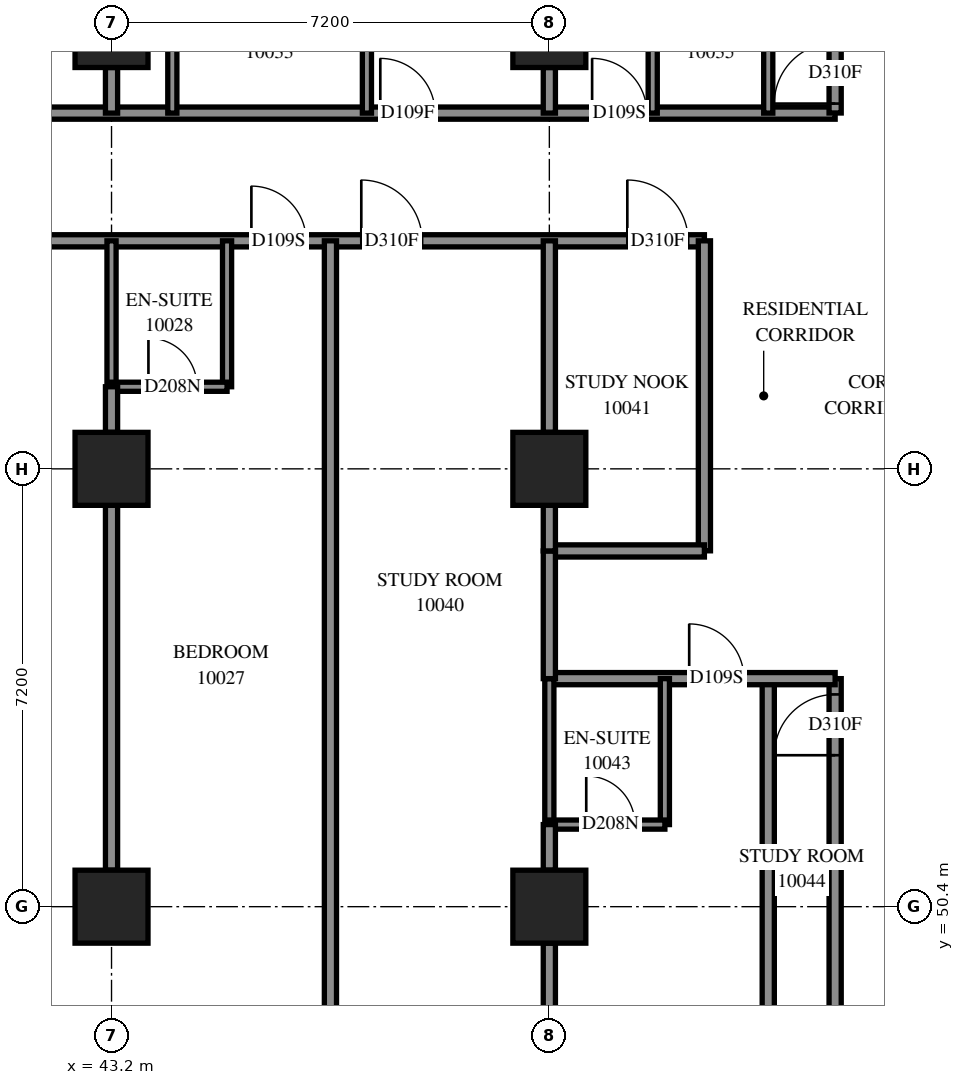
"""IFC4 building model, lengths in metres.
Left out: names, types, materials, properties, quantities, classifications, styles, units other than length and angle.
Written with IfcOpenShell. Run it as: python <this file> out.ifc"""

import sys

from ifc_helpers import new_model, si_unit, direction, frame, frame_2d, origin, origin_2d, place, context, subcontext, project, spatial, rectangle, extrude, element, fill, save


model = new_model("IFC4")
c1 = context("Model", 3, precision=1e-05, world=origin(), true_north=direction((0.0, 1.0)))
c2 = subcontext(c1, "Body", "Model", "MODEL_VIEW")
j1 = project(units=[si_unit("LENGTHUNIT", "METRE"), si_unit("PLANEANGLEUNIT", "RADIAN")], contexts=[c1])
p1 = place(None, origin())
s1 = spatial("IfcSite", under=j1, at=p1, CompositionType="ELEMENT")
p2 = place(p1, origin())
s2 = spatial("IfcBuilding", under=s1, at=p2, CompositionType="ELEMENT")
p3 = place(p2, frame((0.0, 0.0, 40.6)))
s3 = spatial("IfcBuildingStorey", under=s2, at=p3, CompositionType="ELEMENT", Elevation=40.6)
for number, where, z_axis, x_axis in (
    (1, (43.2, 50.4, 0.0), (0.0, 0.0, 1.0), (1.0, 0.0, 0.0)),
    (2, (43.2, 57.6, 0.0), (0.0, 0.0, 1.0), (1.0, 0.0, 0.0)),
    (3, (43.2, 64.8, 0.0), (0.0, 0.0, 1.0), (1.0, 0.0, 0.0)),
    (4, (50.4, 50.4, 0.0), (0.0, 0.0, 1.0), (1.0, 0.0, 0.0)),
    (5, (50.4, 57.6, 0.0), (0.0, 0.0, 1.0), (1.0, 0.0, 0.0)),
    (6, (50.4, 64.8, 0.0), (0.0, 0.0, 1.0), (1.0, 0.0, 0.0)),
):
    element("IfcColumn", number, at=place(p3, frame(where, z_axis=z_axis, x_axis=x_axis)), inside=s3, PredefinedType="COLUMN", context=c2, shape_type="SweptSolid", body=[
        extrude(rectangle(XDim=1.2, YDim=1.2, at=origin_2d()), origin(), (0.0, 0.0, 1.0), 3.1),
    ])
p4 = place(p3, frame((28.8, 61.35, 0.0), z_axis=(0.0, 0.0, 1.0), x_axis=(1.0, 0.0, 0.0)))
e7 = element("IfcWall", 7, at=p4, inside=s3, PredefinedType="PARTITIONING", context=c2, shape_type="SweptSolid", body=[
    extrude(rectangle(XDim=24.15, YDim=0.2, at=frame_2d((12.075, 0.0))), origin(), (0.0, 0.0, 1.0), 3.1),
])
p5 = place(p4, frame((2.3, 0.0, 0.0)))
e8 = element("IfcOpeningElement", 8, at=p5, cuts=e7, PredefinedType="OPENING", context=c2, shape_type="SweptSolid", body=[
    extrude(rectangle(XDim=0.9, YDim=2.1, at=frame_2d((0.45, 1.05))), frame((0.0, 0.11, 0.0), z_axis=(0.0, -1.0, 0.0), x_axis=(1.0, 0.0, 0.0)), (0.0, 0.0, 1.0), 0.22),
])
p6 = place(p4, frame((4.125, 0.0, 0.0)))
e9 = element("IfcOpeningElement", 9, at=p6, cuts=e7, PredefinedType="OPENING", context=c2, shape_type="SweptSolid", body=[
    extrude(rectangle(XDim=1.0, YDim=2.1, at=frame_2d((0.5, 1.05))), frame((0.0, 0.11, 0.0), z_axis=(0.0, -1.0, 0.0), x_axis=(1.0, 0.0, 0.0)), (0.0, 0.0, 1.0), 0.22),
])
p7 = place(p4, frame((11.061, 0.0, 0.0)))
e10 = element("IfcOpeningElement", 10, at=p7, cuts=e7, PredefinedType="OPENING", context=c2, shape_type="SweptSolid", body=[
    extrude(rectangle(XDim=0.9, YDim=2.1, at=frame_2d((0.45, 1.05))), frame((0.0, 0.11, 0.0), z_axis=(0.0, -1.0, 0.0), x_axis=(1.0, 0.0, 0.0)), (0.0, 0.0, 1.0), 0.22),
])
p8 = place(p4, frame((16.7, 0.0, 0.0)))
e11 = element("IfcOpeningElement", 11, at=p8, cuts=e7, PredefinedType="OPENING", context=c2, shape_type="SweptSolid", body=[
    extrude(rectangle(XDim=0.9, YDim=2.1, at=frame_2d((0.45, 1.05))), frame((0.0, 0.11, 0.0), z_axis=(0.0, -1.0, 0.0), x_axis=(1.0, 0.0, 0.0)), (0.0, 0.0, 1.0), 0.22),
])
p9 = place(p4, frame((18.508, 0.0, 0.0)))
e12 = element("IfcOpeningElement", 12, at=p9, cuts=e7, PredefinedType="OPENING", context=c2, shape_type="SweptSolid", body=[
    extrude(rectangle(XDim=1.0, YDim=2.1, at=frame_2d((0.5, 1.05))), frame((0.0, 0.11, 0.0), z_axis=(0.0, -1.0, 0.0), x_axis=(1.0, 0.0, 0.0)), (0.0, 0.0, 1.0), 0.22),
])
p10 = place(p4, frame((22.882, 0.0, 0.0)))
e13 = element("IfcOpeningElement", 13, at=p10, cuts=e7, PredefinedType="OPENING", context=c2, shape_type="SweptSolid", body=[
    extrude(rectangle(XDim=1.0, YDim=2.1, at=frame_2d((0.5, 1.05))), frame((0.0, 0.11, 0.0), z_axis=(0.0, -1.0, 0.0), x_axis=(1.0, 0.0, 0.0)), (0.0, 0.0, 1.0), 0.22),
])
p11 = place(p3, frame((33.452, 63.45, 0.0), z_axis=(0.0, 0.0, 1.0), x_axis=(1.0, 0.0, 0.0)))
e14 = element("IfcWall", 14, at=p11, inside=s3, PredefinedType="PARTITIONING", context=c2, shape_type="SweptSolid", body=[
    extrude(rectangle(XDim=21.648, YDim=0.2, at=frame_2d((10.824, 0.0))), origin(), (0.0, 0.0, 1.0), 3.1),
])
p12 = place(p11, frame((0.142, 0.0, 0.0)))
e15 = element("IfcOpeningElement", 15, at=p12, cuts=e14, PredefinedType="OPENING", context=c2, shape_type="SweptSolid", body=[
    extrude(rectangle(XDim=1.0, YDim=2.1, at=frame_2d((0.5, 1.05))), frame((0.0, 0.11, 0.0), z_axis=(0.0, -1.0, 0.0), x_axis=(1.0, 0.0, 0.0)), (0.0, 0.0, 1.0), 0.22),
])
p13 = place(p11, frame((6.412, 0.0, 0.0)))
e16 = element("IfcOpeningElement", 16, at=p13, cuts=e14, PredefinedType="OPENING", context=c2, shape_type="SweptSolid", body=[
    extrude(rectangle(XDim=0.9, YDim=2.1, at=frame_2d((0.45, 1.05))), frame((0.0, 0.11, 0.0), z_axis=(0.0, -1.0, 0.0), x_axis=(1.0, 0.0, 0.0)), (0.0, 0.0, 1.0), 0.22),
])
p14 = place(p11, frame((14.168, 0.0, 0.0)))
e17 = element("IfcOpeningElement", 17, at=p14, cuts=e14, PredefinedType="OPENING", context=c2, shape_type="SweptSolid", body=[
    extrude(rectangle(XDim=0.9, YDim=2.1, at=frame_2d((0.45, 1.05))), frame((0.0, 0.11, 0.0), z_axis=(0.0, -1.0, 0.0), x_axis=(1.0, 0.0, 0.0)), (0.0, 0.0, 1.0), 0.22),
])
p15 = place(p11, frame((17.651, 0.0, 0.0)))
e18 = element("IfcOpeningElement", 18, at=p15, cuts=e14, PredefinedType="OPENING", context=c2, shape_type="SweptSolid", body=[
    extrude(rectangle(XDim=0.9, YDim=2.1, at=frame_2d((0.45, 1.05))), frame((0.0, 0.11, 0.0), z_axis=(0.0, -1.0, 0.0), x_axis=(1.0, 0.0, 0.0)), (0.0, 0.0, 1.0), 0.22),
])
p16 = place(p3, frame((46.8, 48.729, 0.0), z_axis=(0.0, 0.0, 1.0), x_axis=(0.0, 1.0, 0.0)))
e19 = element("IfcWall", 19, at=p16, inside=s3, PredefinedType="PARTITIONING", context=c2, shape_type="SweptSolid", body=[
    extrude(rectangle(XDim=12.621, YDim=0.2, at=frame_2d((6.311, 0.0))), origin(), (0.0, 0.0, 1.0), 3.1),
])
p17 = place(p3, frame((54.0, 42.384, 0.0), z_axis=(0.0, 0.0, 1.0), x_axis=(0.0, 1.0, 0.0)))
e20 = element("IfcWall", 20, at=p17, inside=s3, PredefinedType="PARTITIONING", context=c2, shape_type="SweptSolid", body=[
    extrude(rectangle(XDim=11.766, YDim=0.2, at=frame_2d((5.883, 0.0))), origin(), (0.0, 0.0, 1.0), 3.1),
])
p18 = place(p3, frame((55.1, 47.9, 0.0), z_axis=(0.0, 0.0, 1.0), x_axis=(0.0, 1.0, 0.0)))
e21 = element("IfcWall", 21, at=p18, inside=s3, PredefinedType="PARTITIONING", context=c2, shape_type="SweptSolid", body=[
    extrude(rectangle(XDim=6.25, YDim=0.2, at=frame_2d((3.125, 0.0))), origin(), (0.0, 0.0, 1.0), 3.1),
])
p19 = place(p18, frame((4.99, 0.0, 0.0)))
e22 = element("IfcOpeningElement", 22, at=p19, cuts=e21, PredefinedType="OPENING", context=c2, shape_type="SweptSolid", body=[
    extrude(rectangle(XDim=1.0, YDim=2.1, at=frame_2d((0.5, 1.05))), frame((0.0, 0.11, 0.0), z_axis=(0.0, -1.0, 0.0), x_axis=(1.0, 0.0, 0.0)), (0.0, 0.0, 1.0), 0.22),
])
p20 = place(p3, frame((43.2, 51.0, 0.0), z_axis=(0.0, 0.0, 1.0), x_axis=(0.0, 1.0, 0.0)))
e23 = element("IfcWall", 23, at=p20, inside=s3, PredefinedType="PARTITIONING", context=c2, shape_type="SweptSolid", body=[
    extrude(rectangle(XDim=6.0, YDim=0.2, at=frame_2d((3.0, 0.0))), origin(), (0.0, 0.0, 1.0), 3.1),
])
p21 = place(p3, frame((50.4, 43.8, 0.0), z_axis=(0.0, 0.0, 1.0), x_axis=(0.0, 1.0, 0.0)))
e24 = element("IfcWall", 24, at=p21, inside=s3, PredefinedType="PARTITIONING", context=c2, shape_type="SweptSolid", body=[
    extrude(rectangle(XDim=6.0, YDim=0.2, at=frame_2d((3.0, 0.0))), origin(), (0.0, 0.0, 1.0), 2.6),
])
p22 = place(p3, frame((52.95, 56.252, 0.0), z_axis=(0.0, 0.0, 1.0), x_axis=(0.0, 1.0, 0.0)))
e25 = element("IfcWall", 25, at=p22, inside=s3, PredefinedType="PARTITIONING", context=c2, shape_type="SweptSolid", body=[
    extrude(rectangle(XDim=5.098, YDim=0.2, at=frame_2d((2.549, 0.0))), origin(), (0.0, 0.0, 1.0), 3.1),
])
p23 = place(p3, frame((50.4, 54.15, 0.0), z_axis=(0.0, 0.0, 1.0), x_axis=(1.0, 0.0, 0.0)))
e26 = element("IfcWall", 26, at=p23, inside=s3, PredefinedType="PARTITIONING", context=c2, shape_type="SweptSolid", body=[
    extrude(rectangle(XDim=4.7, YDim=0.2, at=frame_2d((2.35, 0.0))), origin(), (0.0, 0.0, 1.0), 3.1),
])
p24 = place(p23, frame((2.3, 0.0, 0.0)))
e27 = element("IfcOpeningElement", 27, at=p24, cuts=e26, PredefinedType="OPENING", context=c2, shape_type="SweptSolid", body=[
    extrude(rectangle(XDim=0.9, YDim=2.1, at=frame_2d((0.45, 1.05))), frame((0.0, 0.11, 0.0), z_axis=(0.0, -1.0, 0.0), x_axis=(1.0, 0.0, 0.0)), (0.0, 0.0, 1.0), 0.22),
])
p25 = place(p3, frame((55.1, 63.452, 0.0), z_axis=(0.0, 0.0, 1.0), x_axis=(0.0, 1.0, 0.0)))
e28 = element("IfcWall", 28, at=p25, inside=s3, PredefinedType="PARTITIONING", context=c2, shape_type="SweptSolid", body=[
    extrude(rectangle(XDim=3.848, YDim=0.2, at=frame_2d((1.924, 0.0))), origin(), (0.0, 0.0, 1.0), 3.1),
])
p26 = place(p25, frame((0.155, 0.0, 0.0)))
e29 = element("IfcOpeningElement", 29, at=p26, cuts=e28, PredefinedType="OPENING", context=c2, shape_type="SweptSolid", body=[
    extrude(rectangle(XDim=1.0, YDim=2.1, at=frame_2d((0.5, 1.05))), frame((0.0, 0.11, 0.0), z_axis=(0.0, -1.0, 0.0), x_axis=(1.0, 0.0, 0.0)), (0.0, 0.0, 1.0), 0.22),
])
p27 = place(p3, frame((50.4, 58.2, 0.0), z_axis=(0.0, 0.0, 1.0), x_axis=(0.0, 1.0, 0.0)))
e30 = element("IfcWall", 30, at=p27, inside=s3, PredefinedType="PARTITIONING", context=c2, shape_type="SweptSolid", body=[
    extrude(rectangle(XDim=3.15, YDim=0.2, at=frame_2d((1.575, 0.0))), origin(), (0.0, 0.0, 1.0), 3.1),
])
p28 = place(p3, frame((50.4, 56.25, 0.0), z_axis=(0.0, 0.0, 1.0), x_axis=(1.0, 0.0, 0.0)))
e31 = element("IfcWall", 31, at=p28, inside=s3, PredefinedType="PARTITIONING", context=c2, shape_type="SweptSolid", body=[
    extrude(rectangle(XDim=2.55, YDim=0.2, at=frame_2d((1.275, 0.0))), origin(), (0.0, 0.0, 1.0), 3.1),
])
for number, where, z_axis, x_axis in (
    (32, (45.1, 58.95, 0.0), (0.0, 0.0, 1.0), (0.0, 1.0, 0.0)),
    (33, (43.2, 58.95, 0.0), (0.0, 0.0, 1.0), (0.0, 1.0, 0.0)),
    (34, (52.3, 51.75, 0.0), (0.0, 0.0, 1.0), (0.0, 1.0, 0.0)),
    (35, (50.4, 51.75, 0.0), (0.0, 0.0, 1.0), (0.0, 1.0, 0.0)),
    (36, (44.2, 63.45, 0.0), (0.0, 0.0, 1.0), (0.0, 1.0, 0.0)),
    (37, (47.4, 63.45, 0.0), (0.0, 0.0, 1.0), (0.0, 1.0, 0.0)),
    (38, (52.1, 63.45, 0.0), (0.0, 0.0, 1.0), (0.0, 1.0, 0.0)),
    (39, (54.0, 63.45, 0.0), (0.0, 0.0, 1.0), (0.0, 1.0, 0.0)),
):
    element("IfcWall", number, at=place(p3, frame(where, z_axis=z_axis, x_axis=x_axis)), inside=s3, PredefinedType="PARTITIONING", context=c2, shape_type="SweptSolid", body=[
        extrude(rectangle(XDim=2.4, YDim=0.15, at=frame_2d((1.2, 0.0))), origin(), (0.0, 0.0, 1.0), 3.1),
    ])
p29 = place(p3, frame((50.4, 54.15, 0.0), z_axis=(0.0, 0.0, 1.0), x_axis=(0.0, 1.0, 0.0)))
e40 = element("IfcWall", 40, at=p29, inside=s3, PredefinedType="PARTITIONING", context=c2, shape_type="SweptSolid", body=[
    extrude(rectangle(XDim=2.1, YDim=0.2, at=frame_2d((1.05, 0.0))), origin(), (0.0, 0.0, 1.0), 3.1),
])
p30 = place(p3, frame((43.2, 58.95, 0.0), z_axis=(0.0, 0.0, 1.0), x_axis=(1.0, 0.0, 0.0)))
e41 = element("IfcWall", 41, at=p30, inside=s3, PredefinedType="PARTITIONING", context=c2, shape_type="SweptSolid", body=[
    extrude(rectangle(XDim=1.9, YDim=0.15, at=frame_2d((0.95, 0.0))), origin(), (0.0, 0.0, 1.0), 3.1),
])
p31 = place(p30, frame((0.607, 0.0, 0.0)))
e42 = element("IfcOpeningElement", 42, at=p31, cuts=e41, PredefinedType="OPENING", context=c2, shape_type="SweptSolid", body=[
    extrude(rectangle(XDim=0.8, YDim=2.1, at=frame_2d((0.4, 1.05))), frame((0.0, 0.085, 0.0), z_axis=(0.0, -1.0, 0.0), x_axis=(1.0, 0.0, 0.0)), (0.0, 0.0, 1.0), 0.17),
])
p32 = place(p3, frame((50.4, 51.75, 0.0), z_axis=(0.0, 0.0, 1.0), x_axis=(1.0, 0.0, 0.0)))
e43 = element("IfcWall", 43, at=p32, inside=s3, PredefinedType="PARTITIONING", context=c2, shape_type="SweptSolid", body=[
    extrude(rectangle(XDim=1.9, YDim=0.15, at=frame_2d((0.95, 0.0))), origin(), (0.0, 0.0, 1.0), 3.1),
])
p33 = place(p32, frame((0.607, 0.0, 0.0)))
e44 = element("IfcOpeningElement", 44, at=p33, cuts=e43, PredefinedType="OPENING", context=c2, shape_type="SweptSolid", body=[
    extrude(rectangle(XDim=0.8, YDim=2.1, at=frame_2d((0.4, 1.05))), frame((0.0, 0.085, 0.0), z_axis=(0.0, -1.0, 0.0), x_axis=(1.0, 0.0, 0.0)), (0.0, 0.0, 1.0), 0.17),
])
for number, where, z_axis, x_axis in (
    (45, (43.2, 58.2, 0.0), (0.0, 0.0, 1.0), (0.0, 1.0, 0.0)),
    (46, (43.2, 63.45, 0.0), (0.0, 0.0, 1.0), (0.0, 1.0, 0.0)),
    (47, (50.4, 51.0, 0.0), (0.0, 0.0, 1.0), (0.0, 1.0, 0.0)),
    (48, (50.4, 56.25, 0.0), (0.0, 0.0, 1.0), (0.0, 1.0, 0.0)),
    (49, (50.4, 63.45, 0.0), (0.0, 0.0, 1.0), (0.0, 1.0, 0.0)),
):
    element("IfcWall", number, at=place(p3, frame(where, z_axis=z_axis, x_axis=x_axis)), inside=s3, PredefinedType="PARTITIONING", context=c2, shape_type="SweptSolid", body=[
        extrude(rectangle(XDim=0.75, YDim=0.2, at=frame_2d((0.375, 0.0))), origin(), (0.0, 0.0, 1.0), 3.1),
    ])
p34 = place(p8, origin())
e50 = element("IfcDoor", 50, at=p34, inside=s3, OperationType="SINGLE_SWING_LEFT", PredefinedType="DOOR", context=c2, shape_type="SweptSolid", body=[
    extrude(rectangle(XDim=0.9, YDim=2.1, at=frame_2d((0.45, 1.05))), frame((0.0, 0.025, 0.0), z_axis=(0.0, -1.0, 0.0), x_axis=(1.0, 0.0, 0.0)), (0.0, 0.0, 1.0), 0.05),
])
fill(e11, e50)
p35 = place(p31, origin())
e51 = element("IfcDoor", 51, at=p35, inside=s3, OperationType="SINGLE_SWING_RIGHT", PredefinedType="DOOR", context=c2, shape_type="SweptSolid", body=[
    extrude(rectangle(XDim=0.8, YDim=2.1, at=frame_2d((0.4, 1.05))), frame((0.0, 0.025, 0.0), z_axis=(0.0, -1.0, 0.0), x_axis=(1.0, 0.0, 0.0)), (0.0, 0.0, 1.0), 0.05),
])
fill(e42, e51)
p36 = place(p14, origin())
e52 = element("IfcDoor", 52, at=p36, inside=s3, OperationType="SINGLE_SWING_RIGHT", PredefinedType="DOOR", context=c2, shape_type="SweptSolid", body=[
    extrude(rectangle(XDim=0.9, YDim=2.1, at=frame_2d((0.45, 1.05))), frame((0.0, 0.025, 0.0), z_axis=(0.0, -1.0, 0.0), x_axis=(1.0, 0.0, 0.0)), (0.0, 0.0, 1.0), 0.05),
])
fill(e17, e52)
p37 = place(p15, origin())
e53 = element("IfcDoor", 53, at=p37, inside=s3, OperationType="SINGLE_SWING_RIGHT", PredefinedType="DOOR", context=c2, shape_type="SweptSolid", body=[
    extrude(rectangle(XDim=0.9, YDim=2.1, at=frame_2d((0.45, 1.05))), frame((0.0, 0.025, 0.0), z_axis=(0.0, -1.0, 0.0), x_axis=(1.0, 0.0, 0.0)), (0.0, 0.0, 1.0), 0.05),
])
fill(e18, e53)
p38 = place(p26, origin())
e54 = element("IfcDoor", 54, at=p38, inside=s3, OperationType="SINGLE_SWING_LEFT", PredefinedType="DOOR", context=c2, shape_type="SweptSolid", body=[
    extrude(rectangle(XDim=1.0, YDim=2.1, at=frame_2d((0.5, 1.05))), frame((0.0, 0.025, 0.0), z_axis=(0.0, -1.0, 0.0), x_axis=(1.0, 0.0, 0.0)), (0.0, 0.0, 1.0), 0.05),
])
fill(e29, e54)
p39 = place(p9, origin())
e55 = element("IfcDoor", 55, at=p39, inside=s3, OperationType="SINGLE_SWING_RIGHT", PredefinedType="DOOR", context=c2, shape_type="SweptSolid", body=[
    extrude(rectangle(XDim=1.0, YDim=2.1, at=frame_2d((0.5, 1.05))), frame((0.0, 0.025, 0.0), z_axis=(0.0, -1.0, 0.0), x_axis=(1.0, 0.0, 0.0)), (0.0, 0.0, 1.0), 0.05),
])
fill(e12, e55)
p40 = place(p10, origin())
e56 = element("IfcDoor", 56, at=p40, inside=s3, OperationType="SINGLE_SWING_LEFT", PredefinedType="DOOR", context=c2, shape_type="SweptSolid", body=[
    extrude(rectangle(XDim=1.0, YDim=2.1, at=frame_2d((0.5, 1.05))), frame((0.0, 0.025, 0.0), z_axis=(0.0, -1.0, 0.0), x_axis=(1.0, 0.0, 0.0)), (0.0, 0.0, 1.0), 0.05),
])
fill(e13, e56)
p41 = place(p24, origin())
e57 = element("IfcDoor", 57, at=p41, inside=s3, OperationType="SINGLE_SWING_LEFT", PredefinedType="DOOR", context=c2, shape_type="SweptSolid", body=[
    extrude(rectangle(XDim=0.9, YDim=2.1, at=frame_2d((0.45, 1.05))), frame((0.0, 0.025, 0.0), z_axis=(0.0, -1.0, 0.0), x_axis=(1.0, 0.0, 0.0)), (0.0, 0.0, 1.0), 0.05),
])
fill(e27, e57)
p42 = place(p33, origin())
e58 = element("IfcDoor", 58, at=p42, inside=s3, OperationType="SINGLE_SWING_RIGHT", PredefinedType="DOOR", context=c2, shape_type="SweptSolid", body=[
    extrude(rectangle(XDim=0.8, YDim=2.1, at=frame_2d((0.4, 1.05))), frame((0.0, 0.025, 0.0), z_axis=(0.0, -1.0, 0.0), x_axis=(1.0, 0.0, 0.0)), (0.0, 0.0, 1.0), 0.05),
])
fill(e44, e58)
p43 = place(p19, origin())
e59 = element("IfcDoor", 59, at=p43, inside=s3, OperationType="SINGLE_SWING_RIGHT", PredefinedType="DOOR", context=c2, shape_type="SweptSolid", body=[
    extrude(rectangle(XDim=1.0, YDim=2.1, at=frame_2d((0.5, 1.05))), frame((0.0, 0.025, 0.0), z_axis=(0.0, -1.0, 0.0), x_axis=(1.0, 0.0, 0.0)), (0.0, 0.0, 1.0), 0.05),
])
fill(e22, e59)
save(model, sys.argv[1])
